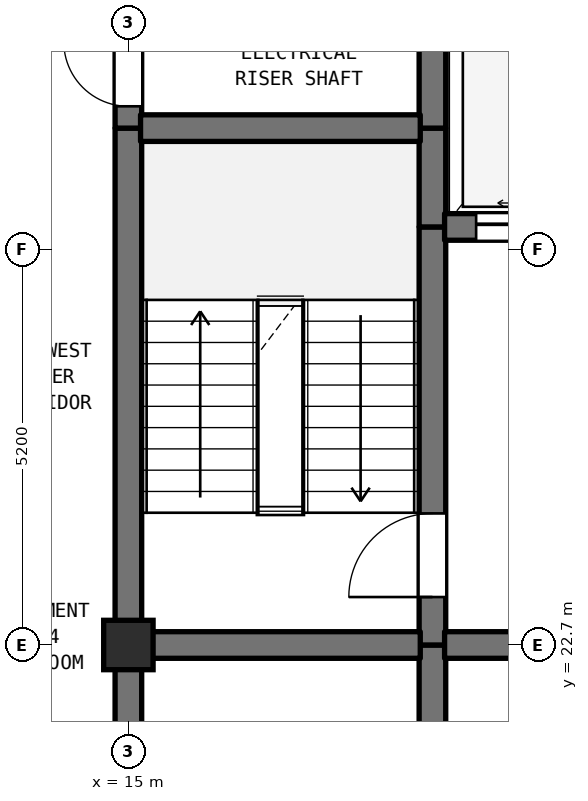
"""IFC4 building model, lengths in metres.
Left out: names, types, materials, properties, quantities, classifications, styles, units other than length and angle.
Written with IfcOpenShell. Run it as: python <this file> out.ifc"""

import sys

from ifc_helpers import new_model, si_unit, direction, frame, frame_2d, origin, origin_2d, place, context, subcontext, project, spatial, rectangle, extrude, element, fill, save


model = new_model("IFC4")
c1 = context("Model", 3, precision=1e-05, world=origin(), true_north=direction((0.0, 1.0)))
c2 = subcontext(c1, "Body", "Model", "MODEL_VIEW")
j1 = project(units=[si_unit("LENGTHUNIT", "METRE"), si_unit("PLANEANGLEUNIT", "RADIAN")], contexts=[c1])
p1 = place(None, origin())
s1 = spatial("IfcSite", under=j1, at=p1, CompositionType="ELEMENT")
p2 = place(p1, origin())
s2 = spatial("IfcBuilding", under=s1, at=p2, CompositionType="ELEMENT")
p3 = place(p2, frame((0.0, 0.0, 307.3)))
s3 = spatial("IfcBuildingStorey", under=s2, at=p3, CompositionType="ELEMENT", Elevation=307.3)
p4 = place(p3, frame((15.0, 22.7, 0.0), z_axis=(0.0, 0.0, 1.0), x_axis=(1.0, 0.0, 0.0)))
e1 = element("IfcColumn", 1, at=p4, inside=s3, PredefinedType="COLUMN", context=c2, shape_type="SweptSolid", body=[
    extrude(rectangle(XDim=0.65, YDim=0.65, at=origin_2d()), origin(), (0.0, 0.0, 1.0), 3.7),
])
p5 = place(p3, frame((15.0, 19.5, 0.0), z_axis=(0.0, 0.0, 1.0), x_axis=(0.0, 1.0, 0.0)))
e2 = element("IfcWall", 2, at=p5, inside=s3, PredefinedType="SHEAR", context=c2, shape_type="SweptSolid", body=[
    extrude(rectangle(XDim=3.2, YDim=0.35, at=frame_2d((1.6, 0.0))), origin(), (0.0, 0.0, 1.0), 3.39),
])
p6 = place(p3, frame((15.0, 22.7, 0.0), z_axis=(0.0, 0.0, 1.0), x_axis=(0.0, 1.0, 0.0)))
e3 = element("IfcWall", 3, at=p6, inside=s3, PredefinedType="SHEAR", context=c2, shape_type="SweptSolid", body=[
    extrude(rectangle(XDim=6.8, YDim=0.35, at=frame_2d((3.4, 0.0))), origin(), (0.0, 0.0, 1.0), 3.39),
])
p7 = place(p3, frame((15.0, 29.5, 0.0), z_axis=(0.0, 0.0, 1.0), x_axis=(0.0, 1.0, 0.0)))
e4 = element("IfcWall", 4, at=p7, inside=s3, PredefinedType="SHEAR", context=c2, shape_type="SweptSolid", body=[
    extrude(rectangle(XDim=1.6, YDim=0.35, at=frame_2d((0.8, 0.0))), origin(), (0.0, 0.0, 1.0), 3.39),
])
p8 = place(p7, frame((0.287, 0.0, 0.0)))
e5 = element("IfcOpeningElement", 5, at=p8, cuts=e4, PredefinedType="OPENING", context=c2, shape_type="SweptSolid", body=[
    extrude(rectangle(XDim=0.85, YDim=2.1, at=frame_2d((0.425, 1.05))), frame((0.0, 0.185, 0.0), z_axis=(0.0, -1.0, 0.0), x_axis=(1.0, 0.0, 0.0)), (0.0, 0.0, 1.0), 0.37),
])
p9 = place(p3, frame((19.0, 19.5, 0.0), z_axis=(0.0, 0.0, 1.0), x_axis=(0.0, 1.0, 0.0)))
e6 = element("IfcWall", 6, at=p9, inside=s3, PredefinedType="SHEAR", context=c2, shape_type="SweptSolid", body=[
    extrude(rectangle(XDim=3.2, YDim=0.35, at=frame_2d((1.6, 0.0))), origin(), (0.0, 0.0, 1.0), 3.39),
])
p10 = place(p3, frame((19.0, 22.7, 0.0), z_axis=(0.0, 0.0, 1.0), x_axis=(0.0, 1.0, 0.0)))
e7 = element("IfcWall", 7, at=p10, inside=s3, PredefinedType="SHEAR", context=c2, shape_type="SweptSolid", body=[
    extrude(rectangle(XDim=5.5, YDim=0.35, at=frame_2d((2.75, 0.0))), origin(), (0.0, 0.0, 1.0), 3.39),
])
p11 = place(p10, frame((0.631, 0.0, 0.0)))
e8 = element("IfcOpeningElement", 8, at=p11, cuts=e7, PredefinedType="OPENING", context=c2, shape_type="SweptSolid", body=[
    extrude(rectangle(XDim=1.1, YDim=2.15, at=frame_2d((0.55, 1.075))), frame((0.0, 0.185, 0.0), z_axis=(0.0, -1.0, 0.0), x_axis=(1.0, 0.0, 0.0)), (0.0, 0.0, 1.0), 0.37),
])
p12 = place(p3, frame((19.0, 28.2, 0.0), z_axis=(0.0, 0.0, 1.0), x_axis=(0.0, 1.0, 0.0)))
e9 = element("IfcWall", 9, at=p12, inside=s3, PredefinedType="SHEAR", context=c2, shape_type="SweptSolid", body=[
    extrude(rectangle(XDim=1.3, YDim=0.35, at=frame_2d((0.65, 0.0))), origin(), (0.0, 0.0, 1.0), 3.39),
])
p13 = place(p3, frame((19.0, 29.5, 0.0), z_axis=(0.0, 0.0, 1.0), x_axis=(0.0, 1.0, 0.0)))
e10 = element("IfcWall", 10, at=p13, inside=s3, PredefinedType="SHEAR", context=c2, shape_type="SweptSolid", body=[
    extrude(rectangle(XDim=5.5, YDim=0.35, at=frame_2d((2.75, 0.0))), origin(), (0.0, 0.0, 1.0), 3.39),
])
p14 = place(p13, frame((2.025, 0.0, 0.0)))
e11 = element("IfcOpeningElement", 11, at=p14, cuts=e10, PredefinedType="OPENING", context=c2, shape_type="SweptSolid", body=[
    extrude(rectangle(XDim=1.1, YDim=2.15, at=frame_2d((0.55, 1.075))), frame((0.0, 0.185, 0.0), z_axis=(0.0, -1.0, 0.0), x_axis=(1.0, 0.0, 0.0)), (0.0, 0.0, 1.0), 0.37),
])
p15 = place(p3, frame((15.16, 22.7, 0.0), z_axis=(0.0, 0.0, 1.0), x_axis=(1.0, 0.0, 0.0)))
e12 = element("IfcWall", 12, at=p15, inside=s3, PredefinedType="SHEAR", context=c2, shape_type="SweptSolid", body=[
    extrude(rectangle(XDim=3.68, YDim=0.35, at=frame_2d((1.84, 0.0))), origin(), (0.0, 0.0, 1.0), 3.39),
])
p16 = place(p3, frame((19.16, 22.7, 0.0), z_axis=(0.0, 0.0, 1.0), x_axis=(1.0, 0.0, 0.0)))
e13 = element("IfcWall", 13, at=p16, inside=s3, PredefinedType="SHEAR", context=c2, shape_type="SweptSolid", body=[
    extrude(rectangle(XDim=4.48, YDim=0.35, at=frame_2d((2.24, 0.0))), origin(), (0.0, 0.0, 1.0), 3.39),
])
p17 = place(p16, frame((1.64, 0.0, 0.0)))
e14 = element("IfcOpeningElement", 14, at=p17, cuts=e13, PredefinedType="OPENING", context=c2, shape_type="SweptSolid", body=[
    extrude(rectangle(XDim=1.2, YDim=2.2, at=frame_2d((0.6, 1.1))), frame((0.0, 0.185, 0.0), z_axis=(0.0, -1.0, 0.0), x_axis=(1.0, 0.0, 0.0)), (0.0, 0.0, 1.0), 0.37),
])
p18 = place(p3, frame((19.16, 28.2, 0.0), z_axis=(0.0, 0.0, 1.0), x_axis=(1.0, 0.0, 0.0)))
e15 = element("IfcWall", 15, at=p18, inside=s3, PredefinedType="SHEAR", context=c2, shape_type="SweptSolid", body=[
    extrude(rectangle(XDim=4.48, YDim=0.35, at=frame_2d((2.24, 0.0))), origin(), (0.0, 0.0, 1.0), 3.39),
])
p19 = place(p18, frame((0.415, 0.0, 0.0)))
e16 = element("IfcOpeningElement", 16, at=p19, cuts=e15, PredefinedType="OPENING", context=c2, shape_type="SweptSolid", body=[
    extrude(rectangle(XDim=1.25, YDim=2.2, at=frame_2d((0.625, 1.1))), frame((0.0, 0.185, 0.0), z_axis=(0.0, -1.0, 0.0), x_axis=(1.0, 0.0, 0.0)), (0.0, 0.0, 1.0), 0.37),
])
p20 = place(p18, frame((2.815, 0.0, 0.0)))
e17 = element("IfcOpeningElement", 17, at=p20, cuts=e15, PredefinedType="OPENING", context=c2, shape_type="SweptSolid", body=[
    extrude(rectangle(XDim=1.25, YDim=2.2, at=frame_2d((0.625, 1.1))), frame((0.0, 0.185, 0.0), z_axis=(0.0, -1.0, 0.0), x_axis=(1.0, 0.0, 0.0)), (0.0, 0.0, 1.0), 0.37),
])
p21 = place(p3, frame((15.16, 29.5, 0.0), z_axis=(0.0, 0.0, 1.0), x_axis=(1.0, 0.0, 0.0)))
e18 = element("IfcWall", 18, at=p21, inside=s3, PredefinedType="SHEAR", context=c2, shape_type="SweptSolid", body=[
    extrude(rectangle(XDim=3.68, YDim=0.35, at=frame_2d((1.84, 0.0))), origin(), (0.0, 0.0, 1.0), 3.39),
])
p22 = place(p8, origin())
e19 = element("IfcDoor", 19, at=p22, inside=s3, OperationType="SINGLE_SWING_RIGHT", PredefinedType="DOOR", context=c2, shape_type="SweptSolid", body=[
    extrude(rectangle(XDim=0.85, YDim=2.1, at=frame_2d((0.425, 1.05))), frame((0.0, 0.025, 0.0), z_axis=(0.0, -1.0, 0.0), x_axis=(1.0, 0.0, 0.0)), (0.0, 0.0, 1.0), 0.05),
])
fill(e5, e19)
p23 = place(p11, origin())
e20 = element("IfcDoor", 20, at=p23, inside=s3, OperationType="SINGLE_SWING_LEFT", PredefinedType="DOOR", context=c2, shape_type="SweptSolid", body=[
    extrude(rectangle(XDim=1.1, YDim=2.15, at=frame_2d((0.55, 1.075))), frame((0.0, 0.025, 0.0), z_axis=(0.0, -1.0, 0.0), x_axis=(1.0, 0.0, 0.0)), (0.0, 0.0, 1.0), 0.05),
])
fill(e8, e20)
p24 = place(p19, origin())
e21 = element("IfcDoor", 21, at=p24, inside=s3, OperationType="DOUBLE_DOOR_SLIDING", PredefinedType="DOOR", context=c2, shape_type="SweptSolid", body=[
    extrude(rectangle(XDim=1.25, YDim=2.2, at=frame_2d((0.625, 1.1))), frame((0.0, 0.025, 0.0), z_axis=(0.0, -1.0, 0.0), x_axis=(1.0, 0.0, 0.0)), (0.0, 0.0, 1.0), 0.05),
])
fill(e16, e21)
save(model, sys.argv[1])
